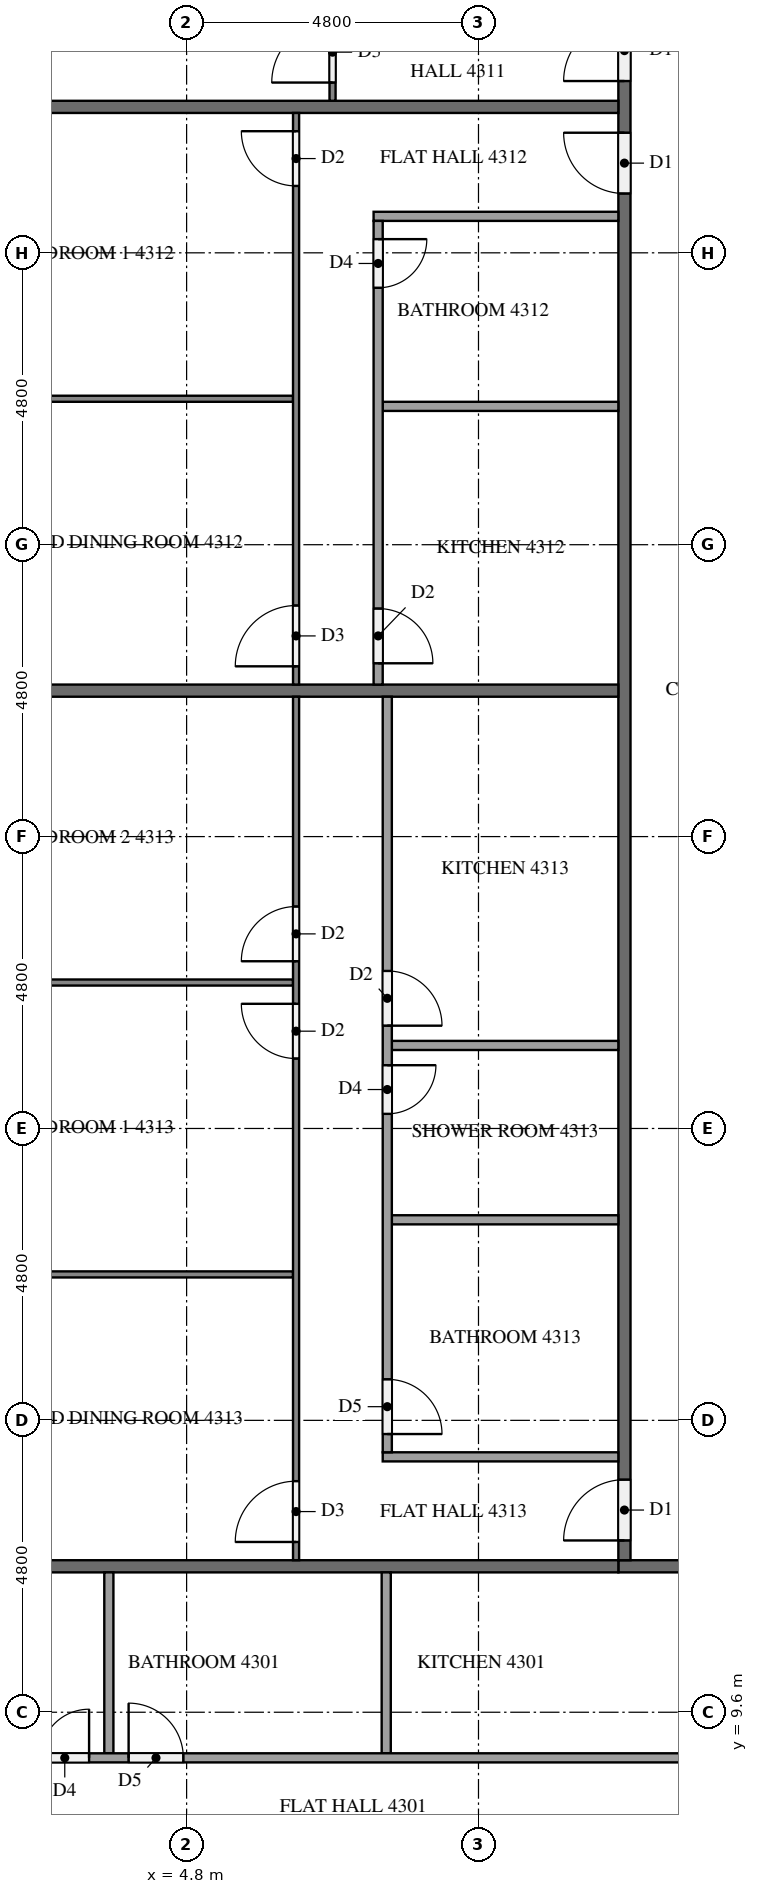
"""IFC4 building model, lengths in metres.
Left out: names, types, materials, properties, quantities, classifications, styles, units other than length and angle.
Written with IfcOpenShell. Run it as: python <this file> out.ifc"""

import sys

from ifc_helpers import new_model, si_unit, direction, frame, frame_2d, origin, place, context, subcontext, project, spatial, rectangle, extrude, element, fill, save


model = new_model("IFC4")
c1 = context("Model", 3, precision=1e-05, world=origin(), true_north=direction((0.0, 1.0)))
c2 = subcontext(c1, "Body", "Model", "MODEL_VIEW")
j1 = project(units=[si_unit("LENGTHUNIT", "METRE"), si_unit("PLANEANGLEUNIT", "RADIAN")], contexts=[c1])
p1 = place(None, origin())
s1 = spatial("IfcSite", under=j1, at=p1, CompositionType="ELEMENT")
p2 = place(p1, origin())
s2 = spatial("IfcBuilding", under=s1, at=p2, CompositionType="ELEMENT")
p3 = place(p2, frame((0.0, 0.0, 166.5)))
s3 = spatial("IfcBuildingStorey", under=s2, at=p3, CompositionType="ELEMENT", Elevation=166.5)
p4 = place(p3, frame((50.5, 12.0, 0.0), z_axis=(0.0, 0.0, 1.0), x_axis=(-1.0, 0.0, 0.0)))
e1 = element("IfcWall", 1, at=p4, inside=s3, PredefinedType="PARTITIONING", context=c2, shape_type="SweptSolid", body=[
    extrude(rectangle(XDim=38.6, YDim=0.2, at=frame_2d((19.3, 0.0))), origin(), (0.0, 0.0, 1.0), 3.2),
])
p5 = place(p4, frame((34.125, 0.0, 0.0)))
e2 = element("IfcOpeningElement", 2, at=p5, cuts=e1, PredefinedType="OPENING", context=c2, shape_type="SweptSolid", body=[
    extrude(rectangle(XDim=1.0, YDim=2.1, at=frame_2d((0.5, 1.05))), frame((0.0, 0.11, 0.0), z_axis=(0.0, -1.0, 0.0), x_axis=(1.0, 0.0, 0.0)), (0.0, 0.0, 1.0), 0.22),
])
p6 = place(p4, frame((32.275, 0.0, 0.0)))
e3 = element("IfcOpeningElement", 3, at=p6, cuts=e1, PredefinedType="OPENING", context=c2, shape_type="SweptSolid", body=[
    extrude(rectangle(XDim=1.0, YDim=2.1, at=frame_2d((0.5, 1.05))), frame((0.0, 0.11, 0.0), z_axis=(0.0, -1.0, 0.0), x_axis=(1.0, 0.0, 0.0)), (0.0, 0.0, 1.0), 0.22),
])
p7 = place(p4, frame((12.525, 0.0, 0.0)))
e4 = element("IfcOpeningElement", 4, at=p7, cuts=e1, PredefinedType="OPENING", context=c2, shape_type="SweptSolid", body=[
    extrude(rectangle(XDim=1.0, YDim=2.1, at=frame_2d((0.5, 1.05))), frame((0.0, 0.11, 0.0), z_axis=(0.0, -1.0, 0.0), x_axis=(1.0, 0.0, 0.0)), (0.0, 0.0, 1.0), 0.22),
])
p8 = place(p4, frame((10.625, 0.0, 0.0)))
e5 = element("IfcOpeningElement", 5, at=p8, cuts=e1, PredefinedType="OPENING", context=c2, shape_type="SweptSolid", body=[
    extrude(rectangle(XDim=1.1, YDim=2.1, at=frame_2d((0.55, 1.05))), frame((0.0, 0.11, 0.0), z_axis=(0.0, -1.0, 0.0), x_axis=(1.0, 0.0, 0.0)), (0.0, 0.0, 1.0), 0.22),
])
p9 = place(p3, frame((12.0, 12.1, 0.0), z_axis=(0.0, 0.0, 1.0), x_axis=(0.0, 1.0, 0.0)))
e6 = element("IfcWall", 6, at=p9, inside=s3, PredefinedType="PARTITIONING", context=c2, shape_type="SweptSolid", body=[
    extrude(rectangle(XDim=28.6, YDim=0.2, at=frame_2d((14.3, 0.0))), origin(), (0.0, 0.0, 1.0), 3.2),
])
p10 = place(p9, frame((24.325, 0.0, 0.0)))
e7 = element("IfcOpeningElement", 7, at=p10, cuts=e6, PredefinedType="OPENING", context=c2, shape_type="SweptSolid", body=[
    extrude(rectangle(XDim=1.0, YDim=2.1, at=frame_2d((0.5, 1.05))), frame((0.0, 0.11, 0.0), z_axis=(0.0, -1.0, 0.0), x_axis=(1.0, 0.0, 0.0)), (0.0, 0.0, 1.0), 0.22),
])
p11 = place(p9, frame((22.475, 0.0, 0.0)))
e8 = element("IfcOpeningElement", 8, at=p11, cuts=e6, PredefinedType="OPENING", context=c2, shape_type="SweptSolid", body=[
    extrude(rectangle(XDim=1.0, YDim=2.1, at=frame_2d((0.5, 1.05))), frame((0.0, 0.11, 0.0), z_axis=(0.0, -1.0, 0.0), x_axis=(1.0, 0.0, 0.0)), (0.0, 0.0, 1.0), 0.22),
])
p12 = place(p9, frame((0.325, 0.0, 0.0)))
e9 = element("IfcOpeningElement", 9, at=p12, cuts=e6, PredefinedType="OPENING", context=c2, shape_type="SweptSolid", body=[
    extrude(rectangle(XDim=1.0, YDim=2.1, at=frame_2d((0.5, 1.05))), frame((0.0, 0.11, 0.0), z_axis=(0.0, -1.0, 0.0), x_axis=(1.0, 0.0, 0.0)), (0.0, 0.0, 1.0), 0.22),
])
for number, where, z_axis, x_axis in (
    (10, (0.1, 12.0, 0.0), (0.0, 0.0, 1.0), (1.0, 0.0, 0.0)),
    (11, (0.1, 36.0, 0.0), (0.0, 0.0, 1.0), (1.0, 0.0, 0.0)),
    (12, (0.1, 26.4, 0.0), (0.0, 0.0, 1.0), (1.0, 0.0, 0.0)),
):
    element("IfcWall", number, at=place(p3, frame(where, z_axis=z_axis, x_axis=x_axis)), inside=s3, PredefinedType="PARTITIONING", context=c2, shape_type="SweptSolid", body=[
        extrude(rectangle(XDim=11.8, YDim=0.2, at=frame_2d((5.9, 0.0))), origin(), (0.0, 0.0, 1.0), 3.2),
    ])
for number, where, z_axis, x_axis in (
    (13, (8.083, 11.9, 0.0), (0.0, 0.0, 1.0), (0.0, -1.0, 0.0)),
    (14, (3.521, 11.9, 0.0), (0.0, 0.0, 1.0), (0.0, -1.0, 0.0)),
):
    element("IfcWall", number, at=place(p3, frame(where, z_axis=z_axis, x_axis=x_axis)), inside=s3, PredefinedType="PARTITIONING", context=c2, shape_type="SweptSolid", body=[
        extrude(rectangle(XDim=2.975, YDim=0.15, at=frame_2d((1.487, 0.0))), origin(), (0.0, 0.0, 1.0), 3.2),
    ])
p13 = place(p3, frame((0.1, 8.85, 0.0), z_axis=(0.0, 0.0, 1.0), x_axis=(1.0, 0.0, 0.0)))
e15 = element("IfcWall", 15, at=p13, inside=s3, PredefinedType="PARTITIONING", context=c2, shape_type="SweptSolid", body=[
    extrude(rectangle(XDim=14.825, YDim=0.15, at=frame_2d((7.413, 0.0))), origin(), (0.0, 0.0, 1.0), 3.2),
])
p14 = place(p13, frame((13.625, 0.0, 0.0)))
e16 = element("IfcOpeningElement", 16, at=p14, cuts=e15, PredefinedType="OPENING", context=c2, shape_type="SweptSolid", body=[
    extrude(rectangle(XDim=0.9, YDim=2.1, at=frame_2d((0.45, 1.05))), frame((0.0, 0.085, 0.0), z_axis=(0.0, -1.0, 0.0), x_axis=(1.0, 0.0, 0.0)), (0.0, 0.0, 1.0), 0.17),
])
p15 = place(p13, frame((3.746, 0.0, 0.0)))
e17 = element("IfcOpeningElement", 17, at=p15, cuts=e15, PredefinedType="OPENING", context=c2, shape_type="SweptSolid", body=[
    extrude(rectangle(XDim=0.9, YDim=2.1, at=frame_2d((0.45, 1.05))), frame((0.0, 0.085, 0.0), z_axis=(0.0, -1.0, 0.0), x_axis=(1.0, 0.0, 0.0)), (0.0, 0.0, 1.0), 0.17),
])
p16 = place(p13, frame((2.296, 0.0, 0.0)))
e18 = element("IfcOpeningElement", 18, at=p16, cuts=e15, PredefinedType="OPENING", context=c2, shape_type="SweptSolid", body=[
    extrude(rectangle(XDim=0.8, YDim=2.1, at=frame_2d((0.4, 1.05))), frame((0.0, 0.085, 0.0), z_axis=(0.0, -1.0, 0.0), x_axis=(1.0, 0.0, 0.0)), (0.0, 0.0, 1.0), 0.17),
])
p17 = place(p3, frame((7.2, 36.1, 0.0), z_axis=(0.0, 0.0, 1.0), x_axis=(0.0, 1.0, 0.0)))
e19 = element("IfcWall", 19, at=p17, inside=s3, PredefinedType="PARTITIONING", context=c2, shape_type="SweptSolid", body=[
    extrude(rectangle(XDim=11.8, YDim=0.1, at=frame_2d((5.9, 0.0))), origin(), (0.0, 0.0, 1.0), 3.2),
])
p18 = place(p17, frame((0.3, 0.0, 0.0)))
e20 = element("IfcOpeningElement", 20, at=p18, cuts=e19, PredefinedType="OPENING", context=c2, shape_type="SweptSolid", body=[
    extrude(rectangle(XDim=1.0, YDim=2.1, at=frame_2d((0.5, 1.05))), frame((0.0, 0.06, 0.0), z_axis=(0.0, -1.0, 0.0), x_axis=(1.0, 0.0, 0.0)), (0.0, 0.0, 1.0), 0.12),
])
p19 = place(p17, frame((10.6, 0.0, 0.0)))
e21 = element("IfcOpeningElement", 21, at=p19, cuts=e19, PredefinedType="OPENING", context=c2, shape_type="SweptSolid", body=[
    extrude(rectangle(XDim=0.9, YDim=2.1, at=frame_2d((0.45, 1.05))), frame((0.0, 0.06, 0.0), z_axis=(0.0, -1.0, 0.0), x_axis=(1.0, 0.0, 0.0)), (0.0, 0.0, 1.0), 0.12),
])
p20 = place(p3, frame((6.55, 31.2, 0.0), z_axis=(0.0, 0.0, 1.0), x_axis=(-1.0, 0.0, 0.0)))
e22 = element("IfcWall", 22, at=p20, inside=s3, PredefinedType="PARTITIONING", context=c2, shape_type="SweptSolid", body=[
    extrude(rectangle(XDim=6.45, YDim=0.1, at=frame_2d((3.225, 0.0))), origin(), (0.0, 0.0, 1.0), 3.2),
])
p21 = place(p3, frame((6.6, 26.5, 0.0), z_axis=(0.0, 0.0, 1.0), x_axis=(0.0, 1.0, 0.0)))
e23 = element("IfcWall", 23, at=p21, inside=s3, PredefinedType="PARTITIONING", context=c2, shape_type="SweptSolid", body=[
    extrude(rectangle(XDim=9.4, YDim=0.1, at=frame_2d((4.7, 0.0))), origin(), (0.0, 0.0, 1.0), 3.2),
])
p22 = place(p21, frame((8.2, 0.0, 0.0)))
e24 = element("IfcOpeningElement", 24, at=p22, cuts=e23, PredefinedType="OPENING", context=c2, shape_type="SweptSolid", body=[
    extrude(rectangle(XDim=0.9, YDim=2.1, at=frame_2d((0.45, 1.05))), frame((0.0, 0.06, 0.0), z_axis=(0.0, -1.0, 0.0), x_axis=(1.0, 0.0, 0.0)), (0.0, 0.0, 1.0), 0.12),
])
p23 = place(p21, frame((0.3, 0.0, 0.0)))
e25 = element("IfcOpeningElement", 25, at=p23, cuts=e23, PredefinedType="OPENING", context=c2, shape_type="SweptSolid", body=[
    extrude(rectangle(XDim=1.0, YDim=2.1, at=frame_2d((0.5, 1.05))), frame((0.0, 0.06, 0.0), z_axis=(0.0, -1.0, 0.0), x_axis=(1.0, 0.0, 0.0)), (0.0, 0.0, 1.0), 0.12),
])
p24 = place(p3, frame((11.9, 31.075, 0.0), z_axis=(0.0, 0.0, 1.0), x_axis=(-1.0, 0.0, 0.0)))
e26 = element("IfcWall", 26, at=p24, inside=s3, PredefinedType="PARTITIONING", context=c2, shape_type="SweptSolid", body=[
    extrude(rectangle(XDim=3.875, YDim=0.15, at=frame_2d((1.938, 0.0))), origin(), (0.0, 0.0, 1.0), 3.2),
])
p25 = place(p3, frame((11.9, 34.2, 0.0), z_axis=(0.0, 0.0, 1.0), x_axis=(-1.0, 0.0, 0.0)))
e27 = element("IfcWall", 27, at=p25, inside=s3, PredefinedType="PARTITIONING", context=c2, shape_type="SweptSolid", body=[
    extrude(rectangle(XDim=4.025, YDim=0.15, at=frame_2d((2.012, 0.0))), origin(), (0.0, 0.0, 1.0), 3.2),
])
p26 = place(p3, frame((7.95, 34.125, 0.0), z_axis=(0.0, 0.0, 1.0), x_axis=(0.0, -1.0, 0.0)))
e28 = element("IfcWall", 28, at=p26, inside=s3, PredefinedType="PARTITIONING", context=c2, shape_type="SweptSolid", body=[
    extrude(rectangle(XDim=7.625, YDim=0.15, at=frame_2d((3.812, 0.0))), origin(), (0.0, 0.0, 1.0), 3.2),
])
p27 = place(p26, frame((0.3, 0.0, 0.0)))
e29 = element("IfcOpeningElement", 29, at=p27, cuts=e28, PredefinedType="OPENING", context=c2, shape_type="SweptSolid", body=[
    extrude(rectangle(XDim=0.8, YDim=2.1, at=frame_2d((0.4, 1.05))), frame((0.0, 0.085, 0.0), z_axis=(0.0, -1.0, 0.0), x_axis=(1.0, 0.0, 0.0)), (0.0, 0.0, 1.0), 0.17),
])
p28 = place(p26, frame((6.375, 0.0, 0.0)))
e30 = element("IfcOpeningElement", 30, at=p28, cuts=e28, PredefinedType="OPENING", context=c2, shape_type="SweptSolid", body=[
    extrude(rectangle(XDim=0.9, YDim=2.1, at=frame_2d((0.45, 1.05))), frame((0.0, 0.085, 0.0), z_axis=(0.0, -1.0, 0.0), x_axis=(1.0, 0.0, 0.0)), (0.0, 0.0, 1.0), 0.17),
])
for number, where, z_axis, x_axis in (
    (31, (6.55, 16.8, 0.0), (0.0, 0.0, 1.0), (-1.0, 0.0, 0.0)),
    (32, (6.55, 21.6, 0.0), (0.0, 0.0, 1.0), (-1.0, 0.0, 0.0)),
):
    element("IfcWall", number, at=place(p3, frame(where, z_axis=z_axis, x_axis=x_axis)), inside=s3, PredefinedType="PARTITIONING", context=c2, shape_type="SweptSolid", body=[
        extrude(rectangle(XDim=6.45, YDim=0.1, at=frame_2d((3.225, 0.0))), origin(), (0.0, 0.0, 1.0), 3.2),
    ])
p29 = place(p3, frame((6.6, 12.1, 0.0), z_axis=(0.0, 0.0, 1.0), x_axis=(0.0, 1.0, 0.0)))
e33 = element("IfcWall", 33, at=p29, inside=s3, PredefinedType="PARTITIONING", context=c2, shape_type="SweptSolid", body=[
    extrude(rectangle(XDim=14.2, YDim=0.1, at=frame_2d((7.1, 0.0))), origin(), (0.0, 0.0, 1.0), 3.2),
])
p30 = place(p29, frame((0.3, 0.0, 0.0)))
e34 = element("IfcOpeningElement", 34, at=p30, cuts=e33, PredefinedType="OPENING", context=c2, shape_type="SweptSolid", body=[
    extrude(rectangle(XDim=1.0, YDim=2.1, at=frame_2d((0.5, 1.05))), frame((0.0, 0.06, 0.0), z_axis=(0.0, -1.0, 0.0), x_axis=(1.0, 0.0, 0.0)), (0.0, 0.0, 1.0), 0.12),
])
p31 = place(p29, frame((8.25, 0.0, 0.0)))
e35 = element("IfcOpeningElement", 35, at=p31, cuts=e33, PredefinedType="OPENING", context=c2, shape_type="SweptSolid", body=[
    extrude(rectangle(XDim=0.9, YDim=2.1, at=frame_2d((0.45, 1.05))), frame((0.0, 0.06, 0.0), z_axis=(0.0, -1.0, 0.0), x_axis=(1.0, 0.0, 0.0)), (0.0, 0.0, 1.0), 0.12),
])
p32 = place(p29, frame((9.85, 0.0, 0.0)))
e36 = element("IfcOpeningElement", 36, at=p32, cuts=e33, PredefinedType="OPENING", context=c2, shape_type="SweptSolid", body=[
    extrude(rectangle(XDim=0.9, YDim=2.1, at=frame_2d((0.45, 1.05))), frame((0.0, 0.06, 0.0), z_axis=(0.0, -1.0, 0.0), x_axis=(1.0, 0.0, 0.0)), (0.0, 0.0, 1.0), 0.12),
])
for number, where, z_axis, x_axis in (
    (37, (11.9, 17.698, 0.0), (0.0, 0.0, 1.0), (-1.0, 0.0, 0.0)),
    (38, (11.9, 20.565, 0.0), (0.0, 0.0, 1.0), (-1.0, 0.0, 0.0)),
):
    element("IfcWall", number, at=place(p3, frame(where, z_axis=z_axis, x_axis=x_axis)), inside=s3, PredefinedType="PARTITIONING", context=c2, shape_type="SweptSolid", body=[
        extrude(rectangle(XDim=3.725, YDim=0.15, at=frame_2d((1.862, 0.0))), origin(), (0.0, 0.0, 1.0), 3.2),
    ])
p33 = place(p3, frame((11.9, 13.8, 0.0), z_axis=(0.0, 0.0, 1.0), x_axis=(-1.0, 0.0, 0.0)))
e39 = element("IfcWall", 39, at=p33, inside=s3, PredefinedType="PARTITIONING", context=c2, shape_type="SweptSolid", body=[
    extrude(rectangle(XDim=3.875, YDim=0.15, at=frame_2d((1.938, 0.0))), origin(), (0.0, 0.0, 1.0), 3.2),
])
p34 = place(p3, frame((8.1, 26.3, 0.0), z_axis=(0.0, 0.0, 1.0), x_axis=(0.0, -1.0, 0.0)))
e40 = element("IfcWall", 40, at=p34, inside=s3, PredefinedType="PARTITIONING", context=c2, shape_type="SweptSolid", body=[
    extrude(rectangle(XDim=12.425, YDim=0.15, at=frame_2d((6.212, 0.0))), origin(), (0.0, 0.0, 1.0), 3.2),
])
p35 = place(p34, frame((11.225, 0.0, 0.0)))
e41 = element("IfcOpeningElement", 41, at=p35, cuts=e40, PredefinedType="OPENING", context=c2, shape_type="SweptSolid", body=[
    extrude(rectangle(XDim=0.9, YDim=2.1, at=frame_2d((0.45, 1.05))), frame((0.0, 0.085, 0.0), z_axis=(0.0, -1.0, 0.0), x_axis=(1.0, 0.0, 0.0)), (0.0, 0.0, 1.0), 0.17),
])
p36 = place(p34, frame((6.06, 0.0, 0.0)))
e42 = element("IfcOpeningElement", 42, at=p36, cuts=e40, PredefinedType="OPENING", context=c2, shape_type="SweptSolid", body=[
    extrude(rectangle(XDim=0.8, YDim=2.1, at=frame_2d((0.4, 1.05))), frame((0.0, 0.085, 0.0), z_axis=(0.0, -1.0, 0.0), x_axis=(1.0, 0.0, 0.0)), (0.0, 0.0, 1.0), 0.17),
])
p37 = place(p34, frame((4.51, 0.0, 0.0)))
e43 = element("IfcOpeningElement", 43, at=p37, cuts=e40, PredefinedType="OPENING", context=c2, shape_type="SweptSolid", body=[
    extrude(rectangle(XDim=0.9, YDim=2.1, at=frame_2d((0.45, 1.05))), frame((0.0, 0.085, 0.0), z_axis=(0.0, -1.0, 0.0), x_axis=(1.0, 0.0, 0.0)), (0.0, 0.0, 1.0), 0.17),
])
p38 = place(p10, origin())
e44 = element("IfcDoor", 44, at=p38, inside=s3, OperationType="SINGLE_SWING_LEFT", PredefinedType="DOOR", context=c2, shape_type="SweptSolid", body=[
    extrude(rectangle(XDim=1.0, YDim=2.1, at=frame_2d((0.5, 1.05))), frame((0.0, 0.025, 0.0), z_axis=(0.0, -1.0, 0.0), x_axis=(1.0, 0.0, 0.0)), (0.0, 0.0, 1.0), 0.05),
])
fill(e7, e44)
p39 = place(p11, origin())
e45 = element("IfcDoor", 45, at=p39, inside=s3, OperationType="SINGLE_SWING_RIGHT", PredefinedType="DOOR", context=c2, shape_type="SweptSolid", body=[
    extrude(rectangle(XDim=1.0, YDim=2.1, at=frame_2d((0.5, 1.05))), frame((0.0, 0.025, 0.0), z_axis=(0.0, -1.0, 0.0), x_axis=(1.0, 0.0, 0.0)), (0.0, 0.0, 1.0), 0.05),
])
fill(e8, e45)
p40 = place(p12, origin())
e46 = element("IfcDoor", 46, at=p40, inside=s3, OperationType="SINGLE_SWING_LEFT", PredefinedType="DOOR", context=c2, shape_type="SweptSolid", body=[
    extrude(rectangle(XDim=1.0, YDim=2.1, at=frame_2d((0.5, 1.05))), frame((0.0, 0.025, 0.0), z_axis=(0.0, -1.0, 0.0), x_axis=(1.0, 0.0, 0.0)), (0.0, 0.0, 1.0), 0.05),
])
fill(e9, e46)
p41 = place(p15, origin())
e47 = element("IfcDoor", 47, at=p41, inside=s3, OperationType="SINGLE_SWING_LEFT", PredefinedType="DOOR", context=c2, shape_type="SweptSolid", body=[
    extrude(rectangle(XDim=0.9, YDim=2.1, at=frame_2d((0.45, 1.05))), frame((0.0, 0.025, 0.0), z_axis=(0.0, -1.0, 0.0), x_axis=(1.0, 0.0, 0.0)), (0.0, 0.0, 1.0), 0.05),
])
fill(e17, e47)
p42 = place(p16, origin())
e48 = element("IfcDoor", 48, at=p42, inside=s3, OperationType="SINGLE_SWING_RIGHT", PredefinedType="DOOR", context=c2, shape_type="SweptSolid", body=[
    extrude(rectangle(XDim=0.8, YDim=2.1, at=frame_2d((0.4, 1.05))), frame((0.0, 0.025, 0.0), z_axis=(0.0, -1.0, 0.0), x_axis=(1.0, 0.0, 0.0)), (0.0, 0.0, 1.0), 0.05),
])
fill(e18, e48)
p43 = place(p18, origin())
e49 = element("IfcDoor", 49, at=p43, inside=s3, OperationType="SINGLE_SWING_LEFT", PredefinedType="DOOR", context=c2, shape_type="SweptSolid", body=[
    extrude(rectangle(XDim=1.0, YDim=2.1, at=frame_2d((0.5, 1.05))), frame((0.0, 0.025, 0.0), z_axis=(0.0, -1.0, 0.0), x_axis=(1.0, 0.0, 0.0)), (0.0, 0.0, 1.0), 0.05),
])
fill(e20, e49)
p44 = place(p22, origin())
e50 = element("IfcDoor", 50, at=p44, inside=s3, OperationType="SINGLE_SWING_RIGHT", PredefinedType="DOOR", context=c2, shape_type="SweptSolid", body=[
    extrude(rectangle(XDim=0.9, YDim=2.1, at=frame_2d((0.45, 1.05))), frame((0.0, 0.025, 0.0), z_axis=(0.0, -1.0, 0.0), x_axis=(1.0, 0.0, 0.0)), (0.0, 0.0, 1.0), 0.05),
])
fill(e24, e50)
p45 = place(p23, origin())
e51 = element("IfcDoor", 51, at=p45, inside=s3, OperationType="SINGLE_SWING_LEFT", PredefinedType="DOOR", context=c2, shape_type="SweptSolid", body=[
    extrude(rectangle(XDim=1.0, YDim=2.1, at=frame_2d((0.5, 1.05))), frame((0.0, 0.025, 0.0), z_axis=(0.0, -1.0, 0.0), x_axis=(1.0, 0.0, 0.0)), (0.0, 0.0, 1.0), 0.05),
])
fill(e25, e51)
p46 = place(p27, origin())
e52 = element("IfcDoor", 52, at=p46, inside=s3, OperationType="SINGLE_SWING_LEFT", PredefinedType="DOOR", context=c2, shape_type="SweptSolid", body=[
    extrude(rectangle(XDim=0.8, YDim=2.1, at=frame_2d((0.4, 1.05))), frame((0.0, 0.025, 0.0), z_axis=(0.0, -1.0, 0.0), x_axis=(1.0, 0.0, 0.0)), (0.0, 0.0, 1.0), 0.05),
])
fill(e29, e52)
p47 = place(p28, origin())
e53 = element("IfcDoor", 53, at=p47, inside=s3, OperationType="SINGLE_SWING_RIGHT", PredefinedType="DOOR", context=c2, shape_type="SweptSolid", body=[
    extrude(rectangle(XDim=0.9, YDim=2.1, at=frame_2d((0.45, 1.05))), frame((0.0, 0.025, 0.0), z_axis=(0.0, -1.0, 0.0), x_axis=(1.0, 0.0, 0.0)), (0.0, 0.0, 1.0), 0.05),
])
fill(e30, e53)
p48 = place(p30, origin())
e54 = element("IfcDoor", 54, at=p48, inside=s3, OperationType="SINGLE_SWING_LEFT", PredefinedType="DOOR", context=c2, shape_type="SweptSolid", body=[
    extrude(rectangle(XDim=1.0, YDim=2.1, at=frame_2d((0.5, 1.05))), frame((0.0, 0.025, 0.0), z_axis=(0.0, -1.0, 0.0), x_axis=(1.0, 0.0, 0.0)), (0.0, 0.0, 1.0), 0.05),
])
fill(e34, e54)
p49 = place(p31, origin())
e55 = element("IfcDoor", 55, at=p49, inside=s3, OperationType="SINGLE_SWING_RIGHT", PredefinedType="DOOR", context=c2, shape_type="SweptSolid", body=[
    extrude(rectangle(XDim=0.9, YDim=2.1, at=frame_2d((0.45, 1.05))), frame((0.0, 0.025, 0.0), z_axis=(0.0, -1.0, 0.0), x_axis=(1.0, 0.0, 0.0)), (0.0, 0.0, 1.0), 0.05),
])
fill(e35, e55)
p50 = place(p32, origin())
e56 = element("IfcDoor", 56, at=p50, inside=s3, OperationType="SINGLE_SWING_LEFT", PredefinedType="DOOR", context=c2, shape_type="SweptSolid", body=[
    extrude(rectangle(XDim=0.9, YDim=2.1, at=frame_2d((0.45, 1.05))), frame((0.0, 0.025, 0.0), z_axis=(0.0, -1.0, 0.0), x_axis=(1.0, 0.0, 0.0)), (0.0, 0.0, 1.0), 0.05),
])
fill(e36, e56)
p51 = place(p35, origin())
e57 = element("IfcDoor", 57, at=p51, inside=s3, OperationType="SINGLE_SWING_RIGHT", PredefinedType="DOOR", context=c2, shape_type="SweptSolid", body=[
    extrude(rectangle(XDim=0.9, YDim=2.1, at=frame_2d((0.45, 1.05))), frame((0.0, 0.025, 0.0), z_axis=(0.0, -1.0, 0.0), x_axis=(1.0, 0.0, 0.0)), (0.0, 0.0, 1.0), 0.05),
])
fill(e41, e57)
p52 = place(p36, origin())
e58 = element("IfcDoor", 58, at=p52, inside=s3, OperationType="SINGLE_SWING_LEFT", PredefinedType="DOOR", context=c2, shape_type="SweptSolid", body=[
    extrude(rectangle(XDim=0.8, YDim=2.1, at=frame_2d((0.4, 1.05))), frame((0.0, 0.025, 0.0), z_axis=(0.0, -1.0, 0.0), x_axis=(1.0, 0.0, 0.0)), (0.0, 0.0, 1.0), 0.05),
])
fill(e42, e58)
p53 = place(p37, origin())
e59 = element("IfcDoor", 59, at=p53, inside=s3, OperationType="SINGLE_SWING_RIGHT", PredefinedType="DOOR", context=c2, shape_type="SweptSolid", body=[
    extrude(rectangle(XDim=0.9, YDim=2.1, at=frame_2d((0.45, 1.05))), frame((0.0, 0.025, 0.0), z_axis=(0.0, -1.0, 0.0), x_axis=(1.0, 0.0, 0.0)), (0.0, 0.0, 1.0), 0.05),
])
fill(e43, e59)
save(model, sys.argv[1])
